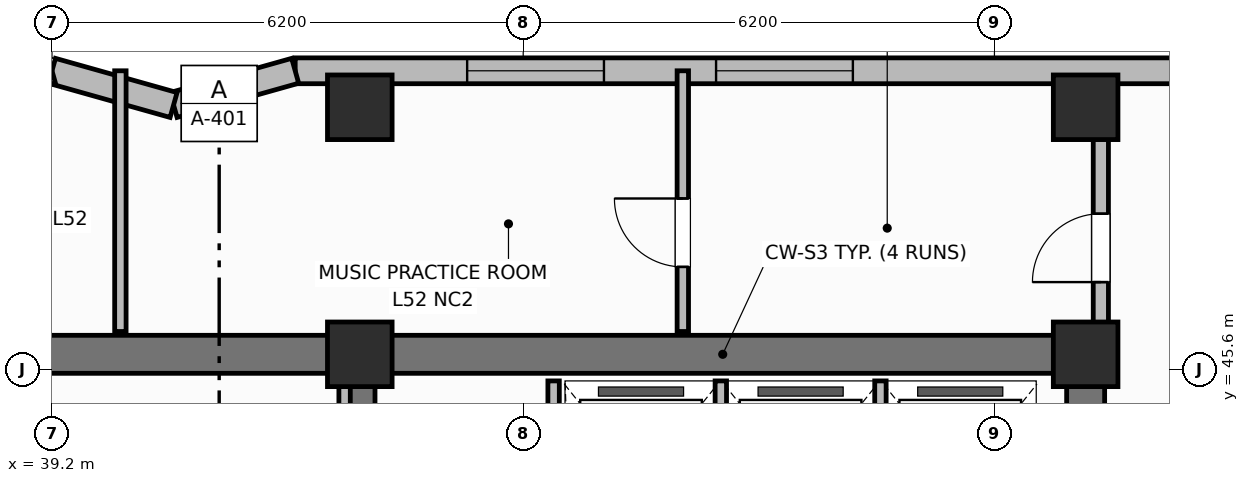
"""IFC4 building model, lengths in metres.
Left out: names, types, materials, properties, quantities, classifications, styles, units other than length and angle.
Written with IfcOpenShell. Run it as: python <this file> out.ifc"""

import sys

from ifc_helpers import new_model, si_unit, direction, frame, frame_2d, origin, origin_2d, place, context, subcontext, project, spatial, rectangle, extrude, element, fill, save


model = new_model("IFC4")
c1 = context("Model", 3, precision=1e-05, world=origin(), true_north=direction((0.0, 1.0)))
c2 = subcontext(c1, "Body", "Model", "MODEL_VIEW")
j1 = project(units=[si_unit("LENGTHUNIT", "METRE"), si_unit("PLANEANGLEUNIT", "RADIAN")], contexts=[c1])
p1 = place(None, origin())
s1 = spatial("IfcSite", under=j1, at=p1, CompositionType="ELEMENT")
p2 = place(p1, origin())
s2 = spatial("IfcBuilding", under=s1, at=p2, CompositionType="ELEMENT")
p3 = place(p2, frame((0.0, 0.0, 211.0)))
s3 = spatial("IfcBuildingStorey", under=s2, at=p3, CompositionType="ELEMENT", Elevation=211.0)
p4 = place(p3, frame((25.6, 45.8, 0.0), z_axis=(0.0, 0.0, 1.0), x_axis=(1.0, 0.0, 0.0)))
e1 = element("IfcWall", 1, at=p4, inside=s3, PredefinedType="SHEAR", context=c2, shape_type="SweptSolid", body=[
    extrude(rectangle(XDim=27.2, YDim=0.5, at=frame_2d((13.6, 0.0))), origin(), (0.0, 0.0, 1.0), 3.7),
])
p5 = place(p3, frame((52.8, 39.85, 0.0), z_axis=(0.0, 0.0, 1.0), x_axis=(0.0, 1.0, 0.0)))
e2 = element("IfcWall", 2, at=p5, inside=s3, PredefinedType="SHEAR", context=c2, shape_type="SweptSolid", body=[
    extrude(rectangle(XDim=5.7, YDim=0.5, at=frame_2d((2.85, 0.0))), origin(), (0.0, 0.0, 1.0), 3.7),
])
p6 = place(p3, frame((43.25, 39.85, 0.0), z_axis=(0.0, 0.0, 1.0), x_axis=(0.0, 1.0, 0.0)))
e3 = element("IfcWall", 3, at=p6, inside=s3, PredefinedType="SHEAR", context=c2, shape_type="SweptSolid", body=[
    extrude(rectangle(XDim=5.7, YDim=0.4, at=frame_2d((2.85, 0.0))), origin(), (0.0, 0.0, 1.0), 3.7),
])
for number, where, z_axis, x_axis in (
    (4, (43.25, 45.8, 0.0), (0.0, 0.0, 1.0), (1.0, 0.0, 0.0)),
    (5, (52.8, 45.8, 0.0), (0.0, 0.0, 1.0), (1.0, 0.0, 0.0)),
    (6, (43.25, 49.05, 0.0), (0.0, 0.0, 1.0), (1.0, 0.0, 0.0)),
    (7, (52.8, 49.05, 0.0), (0.0, 0.0, 1.0), (1.0, 0.0, 0.0)),
):
    element("IfcColumn", number, at=place(p3, frame(where, z_axis=z_axis, x_axis=x_axis)), inside=s3, PredefinedType="COLUMN", context=c2, shape_type="SweptSolid", body=[
        extrude(rectangle(XDim=0.85, YDim=0.85, at=origin_2d()), origin(), (0.0, 0.0, 1.0), 3.7),
    ])
p7 = place(p3, frame((58.2, 49.53, 0.0), z_axis=(0.0, 0.0, 1.0), x_axis=(-1.0, 0.0, 0.0)))
e8 = element("IfcWall", 8, at=p7, inside=s3, PredefinedType="SOLIDWALL", context=c2, shape_type="SweptSolid", body=[
    extrude(rectangle(XDim=15.8, YDim=0.34, at=frame_2d((7.9, 0.0))), origin(), (0.0, 0.0, 1.0), 2.72),
])
p8 = place(p7, frame((0.863, 0.0, 0.75)))
e9 = element("IfcOpeningElement", 9, at=p8, cuts=e8, PredefinedType="OPENING", context=c2, shape_type="SweptSolid", body=[
    extrude(rectangle(XDim=1.8, YDim=1.85, at=frame_2d((0.9, 0.925))), frame((0.0, 0.18, 0.0), z_axis=(0.0, -1.0, 0.0), x_axis=(1.0, 0.0, 0.0)), (0.0, 0.0, 1.0), 0.36),
])
p9 = place(p7, frame((8.462, 0.0, 0.75)))
e10 = element("IfcOpeningElement", 10, at=p9, cuts=e8, PredefinedType="OPENING", context=c2, shape_type="SweptSolid", body=[
    extrude(rectangle(XDim=1.8, YDim=1.85, at=frame_2d((0.9, 0.925))), frame((0.0, 0.18, 0.0), z_axis=(0.0, -1.0, 0.0), x_axis=(1.0, 0.0, 0.0)), (0.0, 0.0, 1.0), 0.36),
])
p10 = place(p7, frame((11.738, 0.0, 0.75)))
e11 = element("IfcOpeningElement", 11, at=p10, cuts=e8, PredefinedType="OPENING", context=c2, shape_type="SweptSolid", body=[
    extrude(rectangle(XDim=1.8, YDim=1.85, at=frame_2d((0.9, 0.925))), frame((0.0, 0.18, 0.0), z_axis=(0.0, -1.0, 0.0), x_axis=(1.0, 0.0, 0.0)), (0.0, 0.0, 1.0), 0.36),
])
p11 = place(p3, frame((42.4, 49.53, 0.0), z_axis=(0.0, 0.0, 1.0), x_axis=(-0.962652136636, -0.270741322725, 0.0)))
e12 = element("IfcWall", 12, at=p11, inside=s3, PredefinedType="SOLIDWALL", context=c2, shape_type="SweptSolid", body=[
    extrude(rectangle(XDim=1.662, YDim=0.34, at=frame_2d((0.831, 0.0))), origin(), (0.0, 0.0, 1.0), 2.72),
])
p12 = place(p3, frame((40.8, 49.08, 0.0), z_axis=(0.0, 0.0, 1.0), x_axis=(-0.962662902433, 0.270703040766, 0.0)))
e13 = element("IfcWall", 13, at=p12, inside=s3, PredefinedType="SOLIDWALL", context=c2, shape_type="SweptSolid", body=[
    extrude(rectangle(XDim=1.662, YDim=0.34, at=frame_2d((0.831, 0.0))), origin(), (0.0, 0.0, 1.0), 2.72),
])
p13 = place(p3, frame((39.2, 49.53, 0.0), z_axis=(0.0, 0.0, 1.0), x_axis=(-0.962652136636, -0.270741322725, 0.0)))
e14 = element("IfcWall", 14, at=p13, inside=s3, PredefinedType="SOLIDWALL", context=c2, shape_type="SweptSolid", body=[
    extrude(rectangle(XDim=1.662, YDim=0.34, at=frame_2d((0.831, 0.0))), origin(), (0.0, 0.0, 1.0), 2.72),
])
for number, where, z_axis, x_axis in (
    (15, (43.05, 39.82, 0.0), (0.0, 0.0, 1.0), (0.0, 1.0, 0.0)),
    (16, (45.8, 39.82, 0.0), (0.0, 0.0, 1.0), (0.0, 1.0, 0.0)),
):
    element("IfcWall", number, at=place(p3, frame(where, z_axis=z_axis, x_axis=x_axis)), inside=s3, PredefinedType="PARTITIONING", context=c2, shape_type="SweptSolid", body=[
        extrude(rectangle(XDim=5.63, YDim=0.15, at=frame_2d((2.815, 0.0))), origin(), (0.0, 0.0, 1.0), 2.55),
    ])
for number, where, z_axis, x_axis in (
    (17, (48.0, 42.65, 0.0), (0.0, 0.0, 1.0), (0.0, 1.0, 0.0)),
    (18, (50.1, 42.65, 0.0), (0.0, 0.0, 1.0), (0.0, 1.0, 0.0)),
):
    element("IfcWall", number, at=place(p3, frame(where, z_axis=z_axis, x_axis=x_axis)), inside=s3, PredefinedType="PARTITIONING", context=c2, shape_type="SweptSolid", body=[
        extrude(rectangle(XDim=2.8, YDim=0.15, at=frame_2d((1.4, 0.0))), origin(), (0.0, 0.0, 1.0), 2.55),
    ])
p14 = place(p3, frame((40.1, 46.1, 0.0), z_axis=(0.0, 0.0, 1.0), x_axis=(0.0, 1.0, 0.0)))
e19 = element("IfcWall", 19, at=p14, inside=s3, PredefinedType="PARTITIONING", context=c2, shape_type="SweptSolid", body=[
    extrude(rectangle(XDim=3.43, YDim=0.15, at=frame_2d((1.715, 0.0))), origin(), (0.0, 0.0, 1.0), 2.55),
])
p15 = place(p3, frame((47.5, 46.1, 0.0), z_axis=(0.0, 0.0, 1.0), x_axis=(0.0, 1.0, 0.0)))
e20 = element("IfcWall", 20, at=p15, inside=s3, PredefinedType="PARTITIONING", context=c2, shape_type="SweptSolid", body=[
    extrude(rectangle(XDim=3.43, YDim=0.15, at=frame_2d((1.715, 0.0))), origin(), (0.0, 0.0, 1.0), 2.55),
])
p16 = place(p15, frame((0.85, 0.0, 0.0)))
e21 = element("IfcOpeningElement", 21, at=p16, cuts=e20, PredefinedType="OPENING", context=c2, shape_type="SweptSolid", body=[
    extrude(rectangle(XDim=0.9, YDim=2.1, at=frame_2d((0.45, 1.05))), frame((0.0, 0.085, 0.0), z_axis=(0.0, -1.0, 0.0), x_axis=(1.0, 0.0, 0.0)), (0.0, 0.0, 1.0), 0.17),
])
p17 = place(p3, frame((53.0, 46.1, 0.0), z_axis=(0.0, 0.0, 1.0), x_axis=(0.0, 1.0, 0.0)))
e22 = element("IfcWall", 22, at=p17, inside=s3, PredefinedType="PARTITIONING", context=c2, shape_type="SweptSolid", body=[
    extrude(rectangle(XDim=2.73, YDim=0.2, at=frame_2d((1.365, 0.0))), origin(), (0.0, 0.0, 1.0), 2.55),
])
p18 = place(p17, frame((0.65, 0.0, 0.0)))
e23 = element("IfcOpeningElement", 23, at=p18, cuts=e22, PredefinedType="OPENING", context=c2, shape_type="SweptSolid", body=[
    extrude(rectangle(XDim=0.9, YDim=2.1, at=frame_2d((0.45, 1.05))), frame((0.0, 0.11, 0.0), z_axis=(0.0, -1.0, 0.0), x_axis=(1.0, 0.0, 0.0)), (0.0, 0.0, 1.0), 0.22),
])
p19 = place(p9, origin())
e24 = element("IfcWindow", 24, at=p19, inside=s3, PartitioningType="SINGLE_PANEL", PredefinedType="WINDOW", context=c2, shape_type="SweptSolid", body=[
    extrude(rectangle(XDim=1.8, YDim=1.85, at=frame_2d((0.9, 0.925))), frame((0.0, 0.03, 0.0), z_axis=(0.0, -1.0, 0.0), x_axis=(1.0, 0.0, 0.0)), (0.0, 0.0, 1.0), 0.06),
])
fill(e10, e24)
p20 = place(p10, origin())
e25 = element("IfcWindow", 25, at=p20, inside=s3, PartitioningType="SINGLE_PANEL", PredefinedType="WINDOW", context=c2, shape_type="SweptSolid", body=[
    extrude(rectangle(XDim=1.8, YDim=1.85, at=frame_2d((0.9, 0.925))), frame((0.0, 0.03, 0.0), z_axis=(0.0, -1.0, 0.0), x_axis=(1.0, 0.0, 0.0)), (0.0, 0.0, 1.0), 0.06),
])
fill(e11, e25)
p21 = place(p16, origin())
e26 = element("IfcDoor", 26, at=p21, inside=s3, OperationType="SINGLE_SWING_RIGHT", PredefinedType="DOOR", context=c2, shape_type="SweptSolid", body=[
    extrude(rectangle(XDim=0.9, YDim=2.1, at=frame_2d((0.45, 1.05))), frame((0.0, 0.025, 0.0), z_axis=(0.0, -1.0, 0.0), x_axis=(1.0, 0.0, 0.0)), (0.0, 0.0, 1.0), 0.05),
])
fill(e21, e26)
p22 = place(p18, origin())
e27 = element("IfcDoor", 27, at=p22, inside=s3, OperationType="SINGLE_SWING_LEFT", PredefinedType="DOOR", context=c2, shape_type="SweptSolid", body=[
    extrude(rectangle(XDim=0.9, YDim=2.1, at=frame_2d((0.45, 1.05))), frame((0.0, 0.025, 0.0), z_axis=(0.0, -1.0, 0.0), x_axis=(1.0, 0.0, 0.0)), (0.0, 0.0, 1.0), 0.05),
])
fill(e23, e27)
save(model, sys.argv[1])
